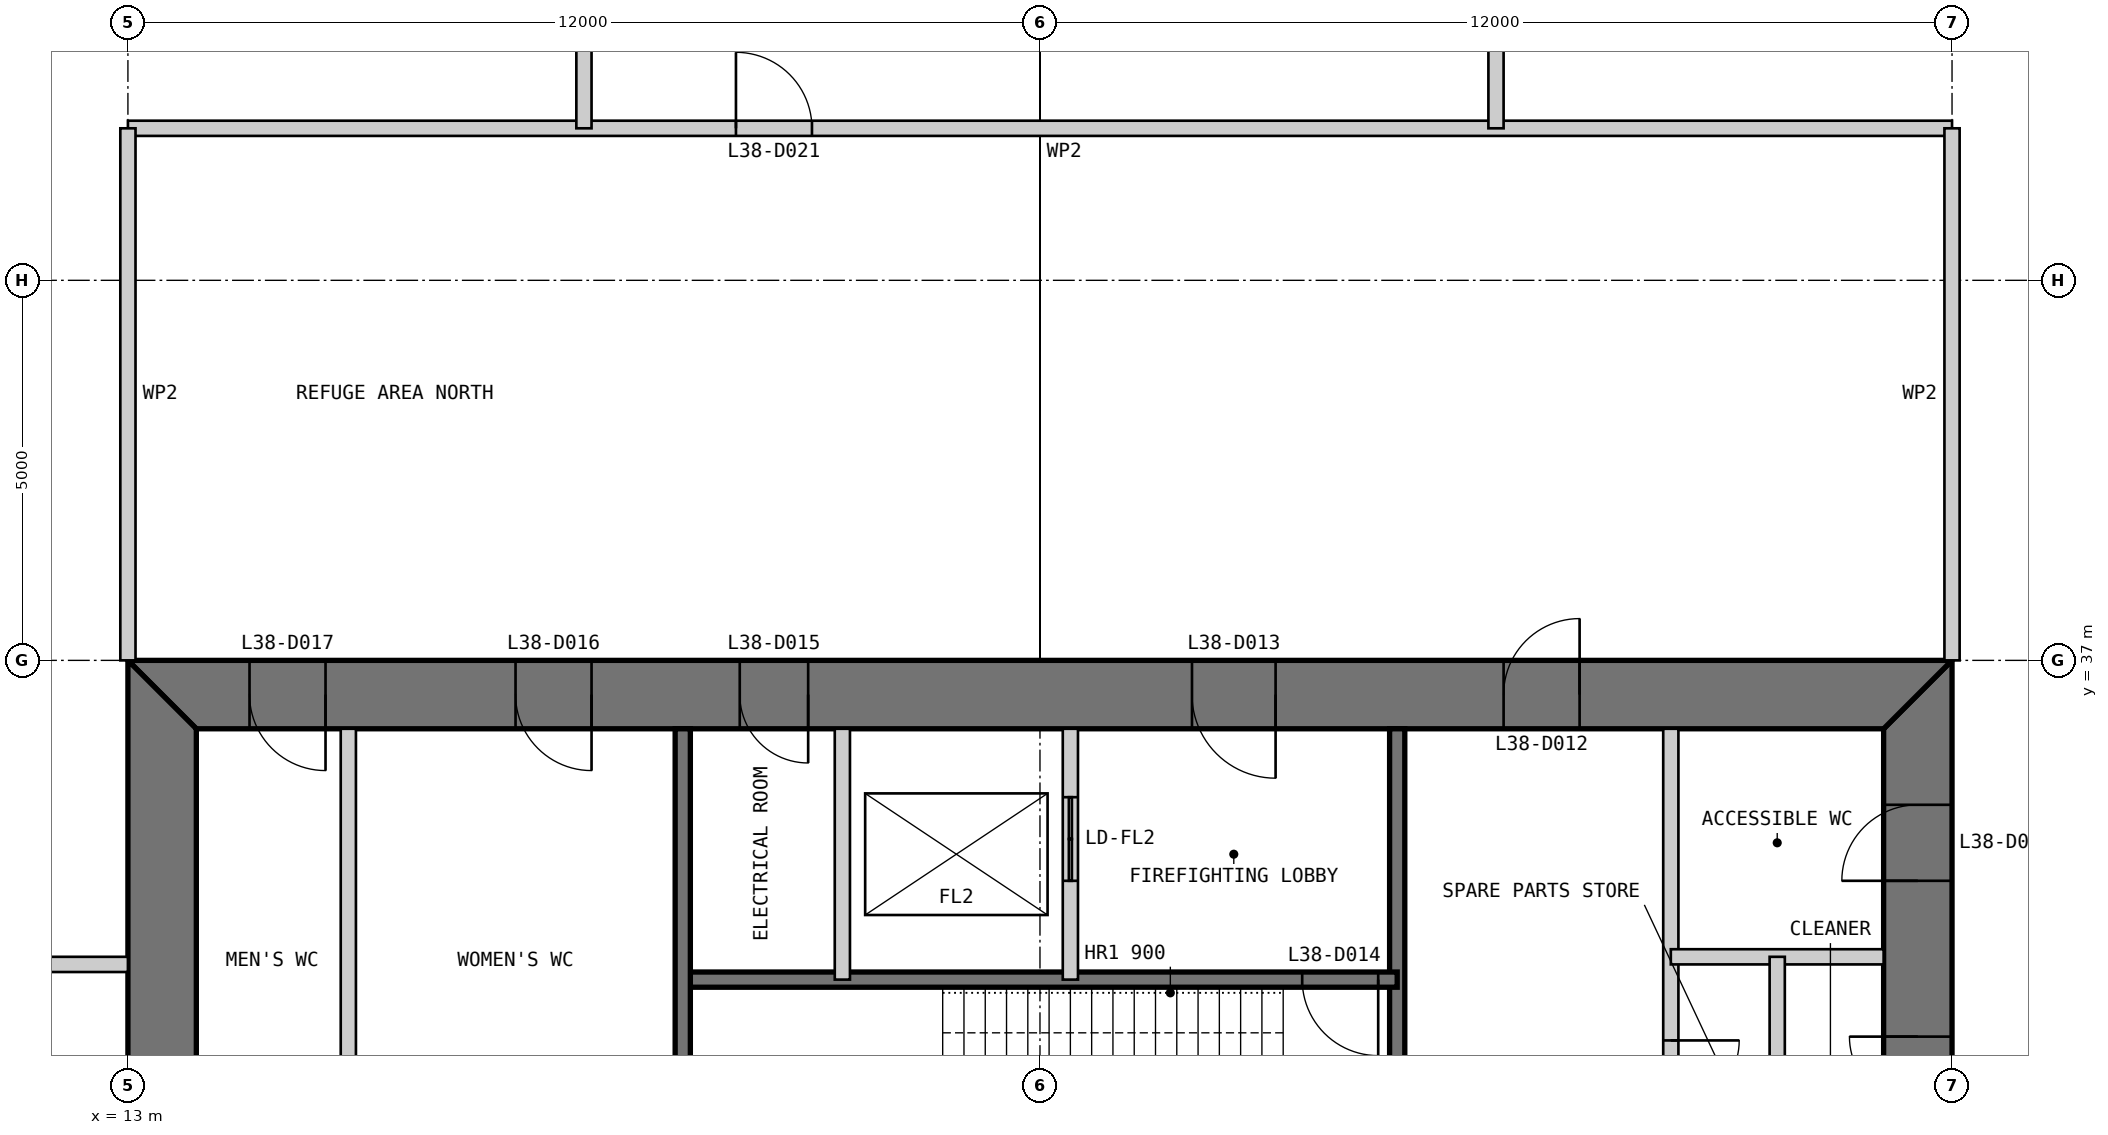
"""IFC4 building model, lengths in metres.
Left out: names, types, materials, properties, quantities, classifications, styles, units other than length and angle.
Written with IfcOpenShell. Run it as: python <this file> out.ifc"""

import sys

from ifc_helpers import new_model, si_unit, direction, frame, frame_2d, origin, place, context, subcontext, project, spatial, polyline, rectangle, outline, extrude, element, fill, save


model = new_model("IFC4")
c1 = context("Model", 3, precision=1e-05, world=origin(), true_north=direction((0.0, 1.0)))
c2 = subcontext(c1, "Body", "Model", "MODEL_VIEW")
j1 = project(units=[si_unit("LENGTHUNIT", "METRE"), si_unit("PLANEANGLEUNIT", "RADIAN")], contexts=[c1])
p1 = place(None, origin())
s1 = spatial("IfcSite", under=j1, at=p1, CompositionType="ELEMENT")
p2 = place(p1, origin())
s2 = spatial("IfcBuilding", under=s1, at=p2, CompositionType="ELEMENT")
p3 = place(p2, frame((0.0, 0.0, 162.4)))
s3 = spatial("IfcBuildingStorey", under=s2, at=p3, CompositionType="ELEMENT", Elevation=162.4)
p4 = place(p3, frame((36.55, 13.9, 0.0), z_axis=(0.0, 0.0, 1.0), x_axis=(0.0, 1.0, 0.0)))
e1 = element("IfcWall", 1, at=p4, inside=s3, PredefinedType="SHEAR", context=c2, shape_type="SweptSolid", body=[
    extrude(outline(polyline([(-0.9, -0.45), (23.1, -0.45), (22.2, 0.45), (0.0, 0.45), (-0.9, -0.45)])), origin(), (0.0, 0.0, 1.0), 6.0),
])
p5 = place(p4, frame((20.2, 0.0, 0.0)))
e2 = element("IfcOpeningElement", 2, at=p5, cuts=e1, PredefinedType="OPENING", context=c2, shape_type="SweptSolid", body=[
    extrude(rectangle(XDim=1.0, YDim=2.2, at=frame_2d((0.5, 1.1))), frame((0.0, 0.46, 0.0), z_axis=(0.0, -1.0, 0.0), x_axis=(1.0, 0.0, 0.0)), (0.0, 0.0, 1.0), 0.92),
])
p6 = place(p4, frame((17.25, 0.0, 0.0)))
e3 = element("IfcOpeningElement", 3, at=p6, cuts=e1, PredefinedType="OPENING", context=c2, shape_type="SweptSolid", body=[
    extrude(rectangle(XDim=0.9, YDim=2.2, at=frame_2d((0.45, 1.1))), frame((0.0, 0.46, 0.0), z_axis=(0.0, -1.0, 0.0), x_axis=(1.0, 0.0, 0.0)), (0.0, 0.0, 1.0), 0.92),
])
p7 = place(p3, frame((37.0, 36.55, 0.0), z_axis=(0.0, 0.0, 1.0), x_axis=(-1.0, 0.0, 0.0)))
e4 = element("IfcWall", 4, at=p7, inside=s3, PredefinedType="SHEAR", context=c2, shape_type="SweptSolid", body=[
    extrude(outline(polyline([(0.0, -0.45), (24.0, -0.45), (23.1, 0.45), (0.9, 0.45), (0.0, -0.45)])), origin(), (0.0, 0.0, 1.0), 6.0),
])
p8 = place(p7, frame((4.9, 0.0, 0.0)))
e5 = element("IfcOpeningElement", 5, at=p8, cuts=e4, PredefinedType="OPENING", context=c2, shape_type="SweptSolid", body=[
    extrude(rectangle(XDim=1.0, YDim=2.2, at=frame_2d((0.5, 1.1))), frame((0.0, 0.46, 0.0), z_axis=(0.0, -1.0, 0.0), x_axis=(1.0, 0.0, 0.0)), (0.0, 0.0, 1.0), 0.92),
])
p9 = place(p7, frame((8.9, 0.0, 0.0)))
e6 = element("IfcOpeningElement", 6, at=p9, cuts=e4, PredefinedType="OPENING", context=c2, shape_type="SweptSolid", body=[
    extrude(rectangle(XDim=1.1, YDim=2.2, at=frame_2d((0.55, 1.1))), frame((0.0, 0.46, 0.0), z_axis=(0.0, -1.0, 0.0), x_axis=(1.0, 0.0, 0.0)), (0.0, 0.0, 1.0), 0.92),
])
p10 = place(p7, frame((15.05, 0.0, 0.0)))
e7 = element("IfcOpeningElement", 7, at=p10, cuts=e4, PredefinedType="OPENING", context=c2, shape_type="SweptSolid", body=[
    extrude(rectangle(XDim=0.9, YDim=2.2, at=frame_2d((0.45, 1.1))), frame((0.0, 0.46, 0.0), z_axis=(0.0, -1.0, 0.0), x_axis=(1.0, 0.0, 0.0)), (0.0, 0.0, 1.0), 0.92),
])
p11 = place(p7, frame((17.9, 0.0, 0.0)))
e8 = element("IfcOpeningElement", 8, at=p11, cuts=e4, PredefinedType="OPENING", context=c2, shape_type="SweptSolid", body=[
    extrude(rectangle(XDim=1.0, YDim=2.2, at=frame_2d((0.5, 1.1))), frame((0.0, 0.46, 0.0), z_axis=(0.0, -1.0, 0.0), x_axis=(1.0, 0.0, 0.0)), (0.0, 0.0, 1.0), 0.92),
])
p12 = place(p7, frame((21.4, 0.0, 0.0)))
e9 = element("IfcOpeningElement", 9, at=p12, cuts=e4, PredefinedType="OPENING", context=c2, shape_type="SweptSolid", body=[
    extrude(rectangle(XDim=1.0, YDim=2.2, at=frame_2d((0.5, 1.1))), frame((0.0, 0.46, 0.0), z_axis=(0.0, -1.0, 0.0), x_axis=(1.0, 0.0, 0.0)), (0.0, 0.0, 1.0), 0.92),
])
p13 = place(p3, frame((13.45, 36.1, 0.0), z_axis=(0.0, 0.0, 1.0), x_axis=(0.0, -1.0, 0.0)))
e10 = element("IfcWall", 10, at=p13, inside=s3, PredefinedType="SHEAR", context=c2, shape_type="SweptSolid", body=[
    extrude(outline(polyline([(-0.9, -0.45), (23.1, -0.45), (22.2, 0.45), (0.0, 0.45), (-0.9, -0.45)])), origin(), (0.0, 0.0, 1.0), 6.0),
])
p14 = place(p13, frame((20.2, 0.0, 0.0)))
e11 = element("IfcOpeningElement", 11, at=p14, cuts=e10, PredefinedType="OPENING", context=c2, shape_type="SweptSolid", body=[
    extrude(rectangle(XDim=1.0, YDim=2.2, at=frame_2d((0.5, 1.1))), frame((0.0, 0.46, 0.0), z_axis=(0.0, -1.0, 0.0), x_axis=(1.0, 0.0, 0.0)), (0.0, 0.0, 1.0), 0.92),
])
p15 = place(p13, frame((17.25, 0.0, 0.0)))
e12 = element("IfcOpeningElement", 12, at=p15, cuts=e10, PredefinedType="OPENING", context=c2, shape_type="SweptSolid", body=[
    extrude(rectangle(XDim=0.9, YDim=2.2, at=frame_2d((0.45, 1.1))), frame((0.0, 0.46, 0.0), z_axis=(0.0, -1.0, 0.0), x_axis=(1.0, 0.0, 0.0)), (0.0, 0.0, 1.0), 0.92),
])
p16 = place(p3, frame((33.3, 36.1, 0.0), z_axis=(0.0, 0.0, 1.0), x_axis=(0.0, -1.0, 0.0)))
e13 = element("IfcWall", 13, at=p16, inside=s3, PredefinedType="PARTITIONING", context=c2, shape_type="SweptSolid", body=[
    extrude(rectangle(XDim=16.1, YDim=0.2, at=frame_2d((8.05, 0.0))), origin(), (0.0, 0.0, 1.0), 5.8),
])
p17 = place(p16, frame((4.1, 0.0, 0.0)))
e14 = element("IfcOpeningElement", 14, at=p17, cuts=e13, PredefinedType="OPENING", context=c2, shape_type="SweptSolid", body=[
    extrude(rectangle(XDim=0.9, YDim=2.2, at=frame_2d((0.45, 1.1))), frame((0.0, 0.11, 0.0), z_axis=(0.0, -1.0, 0.0), x_axis=(1.0, 0.0, 0.0)), (0.0, 0.0, 1.0), 0.22),
])
p18 = place(p3, frame((29.7, 36.1, 0.0), z_axis=(0.0, 0.0, 1.0), x_axis=(0.0, -1.0, 0.0)))
e15 = element("IfcWall", 15, at=p18, inside=s3, PredefinedType="SOLIDWALL", context=c2, shape_type="SweptSolid", body=[
    extrude(rectangle(XDim=16.1, YDim=0.2, at=frame_2d((8.05, 0.0))), origin(), (0.0, 0.0, 1.0), 5.8),
])
p19 = place(p3, frame((29.7, 32.8, 0.0), z_axis=(0.0, 0.0, 1.0), x_axis=(-1.0, 0.0, 0.0)))
e16 = element("IfcWall", 16, at=p19, inside=s3, PredefinedType="SOLIDWALL", context=c2, shape_type="SweptSolid", body=[
    extrude(rectangle(XDim=9.4, YDim=0.2, at=frame_2d((4.7, 0.0))), origin(), (0.0, 0.0, 1.0), 5.8),
])
p20 = place(p19, frame((0.25, 0.0, 0.0)))
e17 = element("IfcOpeningElement", 17, at=p20, cuts=e16, PredefinedType="OPENING", context=c2, shape_type="SweptSolid", body=[
    extrude(rectangle(XDim=1.0, YDim=2.2, at=frame_2d((0.5, 1.1))), frame((0.0, 0.11, 0.0), z_axis=(0.0, -1.0, 0.0), x_axis=(1.0, 0.0, 0.0)), (0.0, 0.0, 1.0), 0.22),
])
p21 = place(p3, frame((25.4, 36.1, 0.0), z_axis=(0.0, 0.0, 1.0), x_axis=(0.0, -1.0, 0.0)))
e18 = element("IfcWall", 18, at=p21, inside=s3, PredefinedType="PARTITIONING", context=c2, shape_type="SweptSolid", body=[
    extrude(rectangle(XDim=3.3, YDim=0.2, at=frame_2d((1.65, 0.0))), origin(), (0.0, 0.0, 1.0), 5.8),
])
p22 = place(p21, frame((0.9, 0.0, 0.0)))
e19 = element("IfcOpeningElement", 19, at=p22, cuts=e18, PredefinedType="OPENING", context=c2, shape_type="SweptSolid", body=[
    extrude(rectangle(XDim=1.1, YDim=2.2, at=frame_2d((0.55, 1.1))), frame((0.0, 0.11, 0.0), z_axis=(0.0, -1.0, 0.0), x_axis=(1.0, 0.0, 0.0)), (0.0, 0.0, 1.0), 0.22),
])
p23 = place(p3, frame((22.4, 36.1, 0.0), z_axis=(0.0, 0.0, 1.0), x_axis=(0.0, -1.0, 0.0)))
e20 = element("IfcWall", 20, at=p23, inside=s3, PredefinedType="PARTITIONING", context=c2, shape_type="SweptSolid", body=[
    extrude(rectangle(XDim=3.3, YDim=0.2, at=frame_2d((1.65, 0.0))), origin(), (0.0, 0.0, 1.0), 5.8),
])
p24 = place(p3, frame((20.3, 36.1, 0.0), z_axis=(0.0, 0.0, 1.0), x_axis=(0.0, -1.0, 0.0)))
e21 = element("IfcWall", 21, at=p24, inside=s3, PredefinedType="SOLIDWALL", context=c2, shape_type="SweptSolid", body=[
    extrude(rectangle(XDim=6.1, YDim=0.2, at=frame_2d((3.05, 0.0))), origin(), (0.0, 0.0, 1.0), 5.8),
])
p25 = place(p3, frame((15.9, 36.1, 0.0), z_axis=(0.0, 0.0, 1.0), x_axis=(0.0, -1.0, 0.0)))
e22 = element("IfcWall", 22, at=p25, inside=s3, PredefinedType="PARTITIONING", context=c2, shape_type="SweptSolid", body=[
    extrude(rectangle(XDim=6.1, YDim=0.2, at=frame_2d((3.05, 0.0))), origin(), (0.0, 0.0, 1.0), 5.8),
])
p26 = place(p3, frame((36.1, 33.1, 0.0), z_axis=(0.0, 0.0, 1.0), x_axis=(-1.0, 0.0, 0.0)))
e23 = element("IfcWall", 23, at=p26, inside=s3, PredefinedType="PARTITIONING", context=c2, shape_type="SweptSolid", body=[
    extrude(rectangle(XDim=2.8, YDim=0.2, at=frame_2d((1.4, 0.0))), origin(), (0.0, 0.0, 1.0), 5.8),
])
p27 = place(p3, frame((34.7, 33.1, 0.0), z_axis=(0.0, 0.0, 1.0), x_axis=(0.0, -1.0, 0.0)))
e24 = element("IfcWall", 24, at=p27, inside=s3, PredefinedType="PARTITIONING", context=c2, shape_type="SweptSolid", body=[
    extrude(rectangle(XDim=3.1, YDim=0.2, at=frame_2d((1.55, 0.0))), origin(), (0.0, 0.0, 1.0), 5.8),
])
p28 = place(p3, frame((13.0, 44.0, 0.0), z_axis=(0.0, 0.0, 1.0), x_axis=(1.0, 0.0, 0.0)))
e25 = element("IfcWall", 25, at=p28, inside=s3, PredefinedType="PARTITIONING", context=c2, shape_type="SweptSolid", body=[
    extrude(rectangle(XDim=24.0, YDim=0.2, at=frame_2d((12.0, 0.0))), origin(), (0.0, 0.0, 1.0), 5.8),
])
p29 = place(p28, frame((8.0, 0.0, 0.0)))
e26 = element("IfcOpeningElement", 26, at=p29, cuts=e25, PredefinedType="OPENING", context=c2, shape_type="SweptSolid", body=[
    extrude(rectangle(XDim=1.0, YDim=2.2, at=frame_2d((0.5, 1.1))), frame((0.0, 0.11, 0.0), z_axis=(0.0, -1.0, 0.0), x_axis=(1.0, 0.0, 0.0)), (0.0, 0.0, 1.0), 0.22),
])
for number, where, z_axis, x_axis in (
    (27, (37.0, 44.0, 0.0), (0.0, 0.0, 1.0), (0.0, -1.0, 0.0)),
    (28, (13.0, 37.0, 0.0), (0.0, 0.0, 1.0), (0.0, 1.0, 0.0)),
):
    element("IfcWall", number, at=place(p3, frame(where, z_axis=z_axis, x_axis=x_axis)), inside=s3, PredefinedType="PARTITIONING", context=c2, shape_type="SweptSolid", body=[
        extrude(rectangle(XDim=7.0, YDim=0.2, at=frame_2d((3.5, 0.0))), origin(), (0.0, 0.0, 1.0), 4.807),
    ])
p30 = place(p3, frame((19.0, 44.0, 0.0), z_axis=(0.0, 0.0, 1.0), x_axis=(0.0, 1.0, 0.0)))
e29 = element("IfcWall", 29, at=p30, inside=s3, PredefinedType="PARTITIONING", context=c2, shape_type="SweptSolid", body=[
    extrude(rectangle(XDim=4.0, YDim=0.2, at=frame_2d((2.0, 0.0))), origin(), (0.0, 0.0, 1.0), 4.954),
])
p31 = place(p30, frame((1.1, 0.0, 0.0)))
e30 = element("IfcOpeningElement", 30, at=p31, cuts=e29, PredefinedType="OPENING", context=c2, shape_type="SweptSolid", body=[
    extrude(rectangle(XDim=1.8, YDim=2.4, at=frame_2d((0.9, 1.2))), frame((0.0, 0.11, 0.0), z_axis=(0.0, -1.0, 0.0), x_axis=(1.0, 0.0, 0.0)), (0.0, 0.0, 1.0), 0.22),
])
p32 = place(p3, frame((31.0, 44.0, 0.0), z_axis=(0.0, 0.0, 1.0), x_axis=(0.0, 1.0, 0.0)))
e31 = element("IfcWall", 31, at=p32, inside=s3, PredefinedType="PARTITIONING", context=c2, shape_type="SweptSolid", body=[
    extrude(rectangle(XDim=4.0, YDim=0.2, at=frame_2d((2.0, 0.0))), origin(), (0.0, 0.0, 1.0), 4.954),
])
p33 = place(p32, frame((1.1, 0.0, 0.0)))
e32 = element("IfcOpeningElement", 32, at=p33, cuts=e31, PredefinedType="OPENING", context=c2, shape_type="SweptSolid", body=[
    extrude(rectangle(XDim=1.8, YDim=2.4, at=frame_2d((0.9, 1.2))), frame((0.0, 0.11, 0.0), z_axis=(0.0, -1.0, 0.0), x_axis=(1.0, 0.0, 0.0)), (0.0, 0.0, 1.0), 0.22),
])
p34 = place(p3, frame((2.0, 33.0, 0.0), z_axis=(0.0, 0.0, 1.0), x_axis=(1.0, 0.0, 0.0)))
e33 = element("IfcWall", 33, at=p34, inside=s3, PredefinedType="PARTITIONING", context=c2, shape_type="SweptSolid", body=[
    extrude(rectangle(XDim=11.0, YDim=0.2, at=frame_2d((5.5, 0.0))), origin(), (0.0, 0.0, 1.0), 5.8),
])
p35 = place(p34, frame((4.6, 0.0, 0.0)))
e34 = element("IfcOpeningElement", 34, at=p35, cuts=e33, PredefinedType="OPENING", context=c2, shape_type="SweptSolid", body=[
    extrude(rectangle(XDim=1.8, YDim=2.4, at=frame_2d((0.9, 1.2))), frame((0.0, 0.11, 0.0), z_axis=(0.0, -1.0, 0.0), x_axis=(1.0, 0.0, 0.0)), (0.0, 0.0, 1.0), 0.22),
])
p36 = place(p8, frame((1.0, 0.0, 0.0), z_axis=(0.0, 0.0, 1.0), x_axis=(-1.0, 0.0, 0.0)))
e35 = element("IfcDoor", 35, at=p36, inside=s3, OperationType="SINGLE_SWING_RIGHT", PredefinedType="DOOR", context=c2, shape_type="SweptSolid", body=[
    extrude(rectangle(XDim=1.0, YDim=2.2, at=frame_2d((0.5, 1.1))), frame((0.0, 0.025, 0.0), z_axis=(0.0, -1.0, 0.0), x_axis=(1.0, 0.0, 0.0)), (0.0, 0.0, 1.0), 0.05),
    extrude(outline(polyline([(0.0, 0.0), (0.04, 0.0), (0.04, 2.16), (0.96, 2.16), (0.96, 0.0), (1.0, 0.0), (1.0, 2.2), (0.0, 2.2), (0.0, 0.0)])), frame((0.0, 0.3, 0.0), z_axis=(0.0, -1.0, 0.0), x_axis=(1.0, 0.0, 0.0)), (0.0, 0.0, 1.0), 0.6),
])
fill(e5, e35)
p37 = place(p9, origin())
e36 = element("IfcDoor", 36, at=p37, inside=s3, OperationType="SINGLE_SWING_LEFT", PredefinedType="DOOR", context=c2, shape_type="SweptSolid", body=[
    extrude(rectangle(XDim=1.1, YDim=2.2, at=frame_2d((0.55, 1.1))), frame((0.0, 0.025, 0.0), z_axis=(0.0, -1.0, 0.0), x_axis=(1.0, 0.0, 0.0)), (0.0, 0.0, 1.0), 0.05),
    extrude(outline(polyline([(0.0, 0.0), (0.04, 0.0), (0.04, 2.16), (1.06, 2.16), (1.06, 0.0), (1.1, 0.0), (1.1, 2.2), (0.0, 2.2), (0.0, 0.0)])), frame((0.0, 0.3, 0.0), z_axis=(0.0, -1.0, 0.0), x_axis=(1.0, 0.0, 0.0)), (0.0, 0.0, 1.0), 0.6),
])
fill(e6, e36)
p38 = place(p20, origin())
e37 = element("IfcDoor", 37, at=p38, inside=s3, OperationType="SINGLE_SWING_LEFT", PredefinedType="DOOR", context=c2, shape_type="SweptSolid", body=[
    extrude(rectangle(XDim=1.0, YDim=2.2, at=frame_2d((0.5, 1.1))), frame((0.0, 0.025, 0.0), z_axis=(0.0, -1.0, 0.0), x_axis=(1.0, 0.0, 0.0)), (0.0, 0.0, 1.0), 0.05),
])
fill(e17, e37)
p39 = place(p10, origin())
e38 = element("IfcDoor", 38, at=p39, inside=s3, OperationType="SINGLE_SWING_LEFT", PredefinedType="DOOR", context=c2, shape_type="SweptSolid", body=[
    extrude(rectangle(XDim=0.9, YDim=2.2, at=frame_2d((0.45, 1.1))), frame((0.0, 0.025, 0.0), z_axis=(0.0, -1.0, 0.0), x_axis=(1.0, 0.0, 0.0)), (0.0, 0.0, 1.0), 0.05),
    extrude(outline(polyline([(0.0, 0.0), (0.04, 0.0), (0.04, 2.16), (0.86, 2.16), (0.86, 0.0), (0.9, 0.0), (0.9, 2.2), (0.0, 2.2), (0.0, 0.0)])), frame((0.0, 0.3, 0.0), z_axis=(0.0, -1.0, 0.0), x_axis=(1.0, 0.0, 0.0)), (0.0, 0.0, 1.0), 0.6),
])
fill(e7, e38)
p40 = place(p11, origin())
e39 = element("IfcDoor", 39, at=p40, inside=s3, OperationType="SINGLE_SWING_LEFT", PredefinedType="DOOR", context=c2, shape_type="SweptSolid", body=[
    extrude(rectangle(XDim=1.0, YDim=2.2, at=frame_2d((0.5, 1.1))), frame((0.0, 0.025, 0.0), z_axis=(0.0, -1.0, 0.0), x_axis=(1.0, 0.0, 0.0)), (0.0, 0.0, 1.0), 0.05),
    extrude(outline(polyline([(0.0, 0.0), (0.04, 0.0), (0.04, 2.16), (0.96, 2.16), (0.96, 0.0), (1.0, 0.0), (1.0, 2.2), (0.0, 2.2), (0.0, 0.0)])), frame((0.0, 0.3, 0.0), z_axis=(0.0, -1.0, 0.0), x_axis=(1.0, 0.0, 0.0)), (0.0, 0.0, 1.0), 0.6),
])
fill(e8, e39)
p41 = place(p12, origin())
e40 = element("IfcDoor", 40, at=p41, inside=s3, OperationType="SINGLE_SWING_LEFT", PredefinedType="DOOR", context=c2, shape_type="SweptSolid", body=[
    extrude(rectangle(XDim=1.0, YDim=2.2, at=frame_2d((0.5, 1.1))), frame((0.0, 0.025, 0.0), z_axis=(0.0, -1.0, 0.0), x_axis=(1.0, 0.0, 0.0)), (0.0, 0.0, 1.0), 0.05),
    extrude(outline(polyline([(0.0, 0.0), (0.04, 0.0), (0.04, 2.16), (0.96, 2.16), (0.96, 0.0), (1.0, 0.0), (1.0, 2.2), (0.0, 2.2), (0.0, 0.0)])), frame((0.0, 0.3, 0.0), z_axis=(0.0, -1.0, 0.0), x_axis=(1.0, 0.0, 0.0)), (0.0, 0.0, 1.0), 0.6),
])
fill(e9, e40)
p42 = place(p5, origin())
e41 = element("IfcDoor", 41, at=p42, inside=s3, OperationType="SINGLE_SWING_LEFT", PredefinedType="DOOR", context=c2, shape_type="SweptSolid", body=[
    extrude(rectangle(XDim=1.0, YDim=2.2, at=frame_2d((0.5, 1.1))), frame((0.0, 0.025, 0.0), z_axis=(0.0, -1.0, 0.0), x_axis=(1.0, 0.0, 0.0)), (0.0, 0.0, 1.0), 0.05),
    extrude(outline(polyline([(0.0, 0.0), (0.04, 0.0), (0.04, 2.16), (0.96, 2.16), (0.96, 0.0), (1.0, 0.0), (1.0, 2.2), (0.0, 2.2), (0.0, 0.0)])), frame((0.0, 0.3, 0.0), z_axis=(0.0, -1.0, 0.0), x_axis=(1.0, 0.0, 0.0)), (0.0, 0.0, 1.0), 0.6),
])
fill(e2, e41)
p43 = place(p17, origin())
e42 = element("IfcDoor", 42, at=p43, inside=s3, OperationType="SINGLE_SWING_LEFT", PredefinedType="DOOR", context=c2, shape_type="SweptSolid", body=[
    extrude(rectangle(XDim=0.9, YDim=2.2, at=frame_2d((0.45, 1.1))), frame((0.0, 0.025, 0.0), z_axis=(0.0, -1.0, 0.0), x_axis=(1.0, 0.0, 0.0)), (0.0, 0.0, 1.0), 0.05),
])
fill(e14, e42)
p44 = place(p6, origin())
e43 = element("IfcDoor", 43, at=p44, inside=s3, OperationType="SINGLE_SWING_RIGHT", PredefinedType="DOOR", context=c2, shape_type="SweptSolid", body=[
    extrude(rectangle(XDim=0.9, YDim=2.2, at=frame_2d((0.45, 1.1))), frame((0.0, 0.025, 0.0), z_axis=(0.0, -1.0, 0.0), x_axis=(1.0, 0.0, 0.0)), (0.0, 0.0, 1.0), 0.05),
    extrude(outline(polyline([(0.0, 0.0), (0.04, 0.0), (0.04, 2.16), (0.86, 2.16), (0.86, 0.0), (0.9, 0.0), (0.9, 2.2), (0.0, 2.2), (0.0, 0.0)])), frame((0.0, 0.3, 0.0), z_axis=(0.0, -1.0, 0.0), x_axis=(1.0, 0.0, 0.0)), (0.0, 0.0, 1.0), 0.6),
])
fill(e3, e43)
p45 = place(p29, origin())
e44 = element("IfcDoor", 44, at=p45, inside=s3, OperationType="SINGLE_SWING_LEFT", PredefinedType="DOOR", context=c2, shape_type="SweptSolid", body=[
    extrude(rectangle(XDim=1.0, YDim=2.2, at=frame_2d((0.5, 1.1))), frame((0.0, 0.025, 0.0), z_axis=(0.0, -1.0, 0.0), x_axis=(1.0, 0.0, 0.0)), (0.0, 0.0, 1.0), 0.05),
])
fill(e26, e44)
p46 = place(p22, origin())
e45 = element("IfcDoor", 45, at=p46, inside=s3, OperationType="DOUBLE_DOOR_SLIDING", PredefinedType="DOOR", context=c2, shape_type="SweptSolid", body=[
    extrude(rectangle(XDim=1.1, YDim=2.2, at=frame_2d((0.55, 1.1))), frame((0.0, 0.025, 0.0), z_axis=(0.0, -1.0, 0.0), x_axis=(1.0, 0.0, 0.0)), (0.0, 0.0, 1.0), 0.05),
])
fill(e19, e45)
save(model, sys.argv[1])
